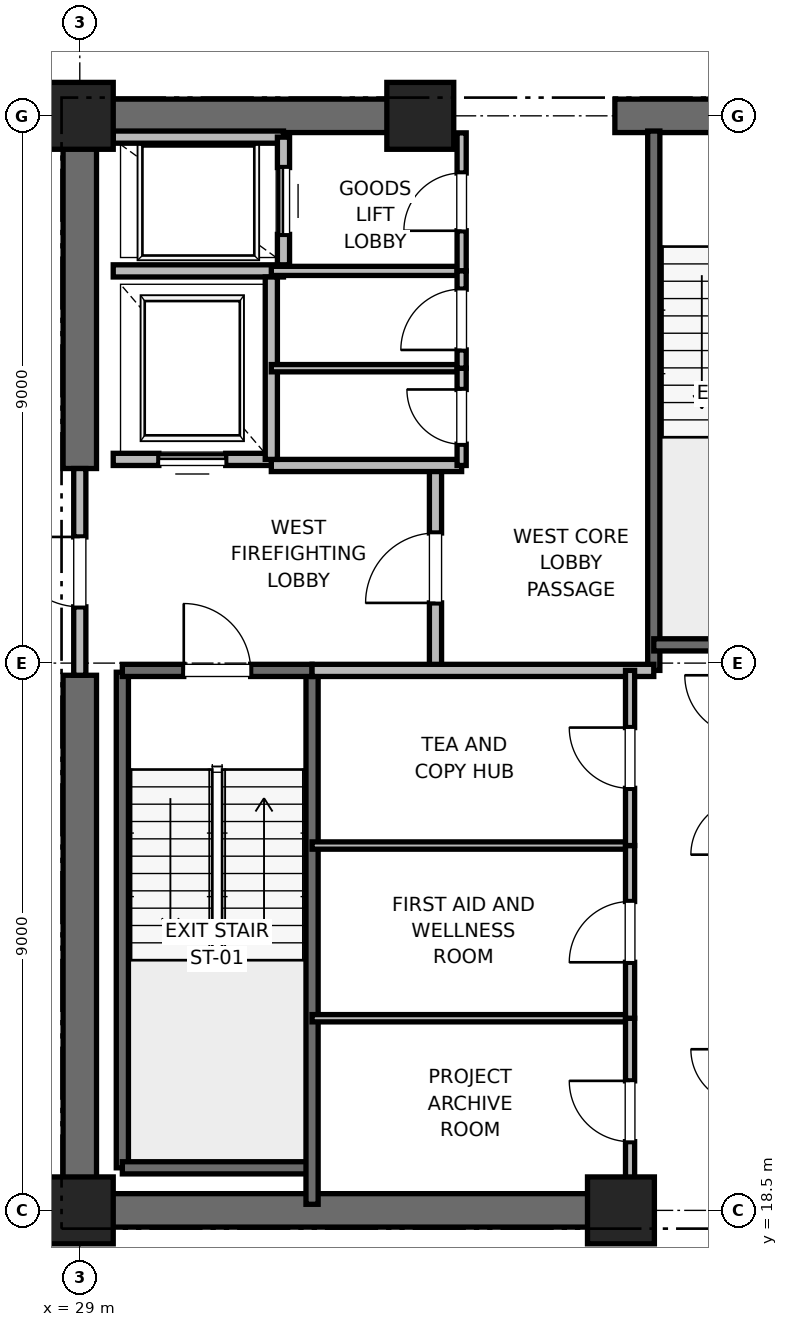
"""IFC4 building model, lengths in metres.
Left out: names, types, materials, properties, quantities, classifications, styles, units other than length and angle.
Written with IfcOpenShell. Run it as: python <this file> out.ifc"""

import sys

from ifc_helpers import new_model, si_unit, direction, frame, frame_2d, origin, origin_2d, place, context, subcontext, project, spatial, rectangle, extrude, element, fill, save


model = new_model("IFC4")
c1 = context("Model", 3, precision=1e-05, world=origin(), true_north=direction((0.0, 1.0)))
c2 = subcontext(c1, "Body", "Model", "MODEL_VIEW")
j1 = project(units=[si_unit("LENGTHUNIT", "METRE"), si_unit("PLANEANGLEUNIT", "RADIAN")], contexts=[c1])
p1 = place(None, origin())
s1 = spatial("IfcSite", under=j1, at=p1, CompositionType="ELEMENT")
p2 = place(p1, origin())
s2 = spatial("IfcBuilding", under=s1, at=p2, CompositionType="ELEMENT")
p3 = place(p2, frame((0.0, 0.0, 172.4)))
s3 = spatial("IfcBuildingStorey", under=s2, at=p3, CompositionType="ELEMENT", Elevation=172.4)
for number, where, z_axis, x_axis in (
    (1, (29.0, 18.5, 0.0), (0.0, 0.0, 1.0), (1.0, 0.0, 0.0)),
    (2, (29.0, 36.5, 0.0), (0.0, 0.0, 1.0), (1.0, 0.0, 0.0)),
    (3, (37.9, 18.5, 0.0), (0.0, 0.0, 1.0), (1.0, 0.0, 0.0)),
    (4, (34.6, 36.5, 0.0), (0.0, 0.0, 1.0), (1.0, 0.0, 0.0)),
):
    element("IfcColumn", number, at=place(p3, frame(where, z_axis=z_axis, x_axis=x_axis)), inside=s3, PredefinedType="PILASTER", context=c2, shape_type="SweptSolid", body=[
        extrude(rectangle(XDim=1.1, YDim=1.1, at=origin_2d()), origin(), (0.0, 0.0, 1.0), 4.0),
    ])
p4 = place(p3, frame((29.0, 18.5, 0.0), z_axis=(0.0, 0.0, 1.0), x_axis=(1.0, 0.0, 0.0)))
e5 = element("IfcWall", 5, at=p4, inside=s3, PredefinedType="SHEAR", context=c2, shape_type="SweptSolid", body=[
    extrude(rectangle(XDim=9.2, YDim=0.55, at=frame_2d((4.6, 0.0))), origin(), (0.0, 0.0, 1.0), 3.775),
])
p5 = place(p3, frame((29.0, 36.5, 0.0), z_axis=(0.0, 0.0, 1.0), x_axis=(1.0, 0.0, 0.0)))
e6 = element("IfcWall", 6, at=p5, inside=s3, PredefinedType="SHEAR", context=c2, shape_type="SweptSolid", body=[
    extrude(rectangle(XDim=5.8, YDim=0.55, at=frame_2d((2.9, 0.0))), origin(), (0.0, 0.0, 1.0), 3.775),
])
p6 = place(p3, frame((37.8, 36.5, 0.0), z_axis=(0.0, 0.0, 1.0), x_axis=(1.0, 0.0, 0.0)))
e7 = element("IfcWall", 7, at=p6, inside=s3, PredefinedType="SHEAR", context=c2, shape_type="SweptSolid", body=[
    extrude(rectangle(XDim=4.4, YDim=0.55, at=frame_2d((2.2, 0.0))), origin(), (0.0, 0.0, 1.0), 3.775),
])
p7 = place(p6, frame((1.65, 0.0, 0.0)))
e8 = element("IfcOpeningElement", 8, at=p7, cuts=e7, PredefinedType="OPENING", context=c2, shape_type="SweptSolid", body=[
    extrude(rectangle(XDim=1.1, YDim=2.15, at=frame_2d((0.55, 1.075))), frame((0.0, 0.275, 0.0), z_axis=(0.0, -1.0, 0.0), x_axis=(1.0, 0.0, 0.0)), (0.0, 0.0, 1.0), 0.55),
])
p8 = place(p3, frame((29.0, 18.5, 0.0), z_axis=(0.0, 0.0, 1.0), x_axis=(0.0, 1.0, 0.0)))
e9 = element("IfcWall", 9, at=p8, inside=s3, PredefinedType="SHEAR", context=c2, shape_type="SweptSolid", body=[
    extrude(rectangle(XDim=8.8, YDim=0.55, at=frame_2d((4.4, 0.0))), origin(), (0.0, 0.0, 1.0), 3.775),
])
p9 = place(p3, frame((29.0, 30.7, 0.0), z_axis=(0.0, 0.0, 1.0), x_axis=(0.0, 1.0, 0.0)))
e10 = element("IfcWall", 10, at=p9, inside=s3, PredefinedType="SHEAR", context=c2, shape_type="SweptSolid", body=[
    extrude(rectangle(XDim=5.8, YDim=0.55, at=frame_2d((2.9, 0.0))), origin(), (0.0, 0.0, 1.0), 3.775),
])
p10 = place(p3, frame((29.7, 19.2, 0.0), z_axis=(0.0, 0.0, 1.0), x_axis=(0.0, 1.0, 0.0)))
e11 = element("IfcWall", 11, at=p10, inside=s3, PredefinedType="SOLIDWALL", context=c2, shape_type="SweptSolid", body=[
    extrude(rectangle(XDim=8.15, YDim=0.2, at=frame_2d((4.075, 0.0))), origin(), (0.0, 0.0, 1.0), 3.775),
])
p11 = place(p3, frame((29.7, 19.2, 0.0), z_axis=(0.0, 0.0, 1.0), x_axis=(1.0, 0.0, 0.0)))
e12 = element("IfcWall", 12, at=p11, inside=s3, PredefinedType="SOLIDWALL", context=c2, shape_type="SweptSolid", body=[
    extrude(rectangle(XDim=3.12, YDim=0.2, at=frame_2d((1.56, 0.0))), origin(), (0.0, 0.0, 1.0), 3.775),
])
p12 = place(p3, frame((32.82, 18.6, 0.0), z_axis=(0.0, 0.0, 1.0), x_axis=(0.0, 1.0, 0.0)))
e13 = element("IfcWall", 13, at=p12, inside=s3, PredefinedType="SOLIDWALL", context=c2, shape_type="SweptSolid", body=[
    extrude(rectangle(XDim=8.78, YDim=0.2, at=frame_2d((4.39, 0.0))), origin(), (0.0, 0.0, 1.0), 3.775),
])
p13 = place(p3, frame((29.7, 27.38, 0.0), z_axis=(0.0, 0.0, 1.0), x_axis=(1.0, 0.0, 0.0)))
e14 = element("IfcWall", 14, at=p13, inside=s3, PredefinedType="SOLIDWALL", context=c2, shape_type="SweptSolid", body=[
    extrude(rectangle(XDim=3.12, YDim=0.2, at=frame_2d((1.56, 0.0))), origin(), (0.0, 0.0, 1.0), 3.775),
])
p14 = place(p13, frame((1.01, 0.0, 0.0)))
e15 = element("IfcOpeningElement", 15, at=p14, cuts=e14, PredefinedType="OPENING", context=c2, shape_type="SweptSolid", body=[
    extrude(rectangle(XDim=1.1, YDim=2.15, at=frame_2d((0.55, 1.075))), frame((0.0, 0.1, 0.0), z_axis=(0.0, -1.0, 0.0), x_axis=(1.0, 0.0, 0.0)), (0.0, 0.0, 1.0), 0.2),
])
p15 = place(p3, frame((38.44, 27.38, 0.0), z_axis=(0.0, 0.0, 1.0), x_axis=(0.0, 1.0, 0.0)))
e16 = element("IfcWall", 16, at=p15, inside=s3, PredefinedType="SOLIDWALL", context=c2, shape_type="SweptSolid", body=[
    extrude(rectangle(XDim=8.87, YDim=0.2, at=frame_2d((4.435, 0.0))), origin(), (0.0, 0.0, 1.0), 3.775),
])
p16 = place(p3, frame((38.44, 27.8, 0.0), z_axis=(0.0, 0.0, 1.0), x_axis=(1.0, 0.0, 0.0)))
e17 = element("IfcWall", 17, at=p16, inside=s3, PredefinedType="SOLIDWALL", context=c2, shape_type="SweptSolid", body=[
    extrude(rectangle(XDim=3.32, YDim=0.2, at=frame_2d((1.66, 0.0))), origin(), (0.0, 0.0, 1.0), 3.775),
])
p17 = place(p3, frame((34.85, 27.38, 0.0), z_axis=(0.0, 0.0, 1.0), x_axis=(0.0, 1.0, 0.0)))
e18 = element("IfcWall", 18, at=p17, inside=s3, PredefinedType="PARTITIONING", context=c2, shape_type="SweptSolid", body=[
    extrude(rectangle(XDim=3.37, YDim=0.2, at=frame_2d((1.685, 0.0))), origin(), (0.0, 0.0, 1.0), 3.775),
])
p18 = place(p17, frame((1.11, 0.0, 0.0)))
e19 = element("IfcOpeningElement", 19, at=p18, cuts=e18, PredefinedType="OPENING", context=c2, shape_type="SweptSolid", body=[
    extrude(rectangle(XDim=1.15, YDim=2.2, at=frame_2d((0.575, 1.1))), frame((0.0, 0.1, 0.0), z_axis=(0.0, -1.0, 0.0), x_axis=(1.0, 0.0, 0.0)), (0.0, 0.0, 1.0), 0.2),
])
p19 = place(p3, frame((29.0, 27.3, 0.0), z_axis=(0.0, 0.0, 1.0), x_axis=(0.0, 1.0, 0.0)))
e20 = element("IfcWall", 20, at=p19, inside=s3, PredefinedType="PARTITIONING", context=c2, shape_type="SweptSolid", body=[
    extrude(rectangle(XDim=3.4, YDim=0.2, at=frame_2d((1.7, 0.0))), origin(), (0.0, 0.0, 1.0), 2.755),
])
p20 = place(p19, frame((1.125, 0.0, 0.0)))
e21 = element("IfcOpeningElement", 21, at=p20, cuts=e20, PredefinedType="OPENING", context=c2, shape_type="SweptSolid", body=[
    extrude(rectangle(XDim=1.15, YDim=2.2, at=frame_2d((0.575, 1.1))), frame((0.0, 0.1, 0.0), z_axis=(0.0, -1.0, 0.0), x_axis=(1.0, 0.0, 0.0)), (0.0, 0.0, 1.0), 0.2),
])
p21 = place(p3, frame((32.82, 27.38, 0.0), z_axis=(0.0, 0.0, 1.0), x_axis=(1.0, 0.0, 0.0)))
e22 = element("IfcWall", 22, at=p21, inside=s3, PredefinedType="PARTITIONING", context=c2, shape_type="SweptSolid", body=[
    extrude(rectangle(XDim=5.62, YDim=0.2, at=frame_2d((2.81, 0.0))), origin(), (0.0, 0.0, 1.0), 3.775),
])
p22 = place(p3, frame((32.15, 30.75, 0.0), z_axis=(0.0, 0.0, 1.0), x_axis=(1.0, 0.0, 0.0)))
e23 = element("IfcWall", 23, at=p22, inside=s3, PredefinedType="PARTITIONING", context=c2, shape_type="SweptSolid", body=[
    extrude(rectangle(XDim=3.13, YDim=0.2, at=frame_2d((1.565, 0.0))), origin(), (0.0, 0.0, 1.0), 3.775),
])
p23 = place(p3, frame((29.55, 30.85, 0.0), z_axis=(0.0, 0.0, 1.0), x_axis=(1.0, 0.0, 0.0)))
e24 = element("IfcWall", 24, at=p23, inside=s3, PredefinedType="SOLIDWALL", context=c2, shape_type="SweptSolid", body=[
    extrude(rectangle(XDim=2.6, YDim=0.2, at=frame_2d((1.3, 0.0))), origin(), (0.0, 0.0, 1.0), 2.755),
])
p24 = place(p23, frame((0.75, 0.0, 0.0)))
e25 = element("IfcOpeningElement", 25, at=p24, cuts=e24, PredefinedType="OPENING", context=c2, shape_type="SweptSolid", body=[
    extrude(rectangle(XDim=1.1, YDim=2.2, at=frame_2d((0.55, 1.1))), frame((0.0, 0.1, 0.0), z_axis=(0.0, -1.0, 0.0), x_axis=(1.0, 0.0, 0.0)), (0.0, 0.0, 1.0), 0.2),
])
p25 = place(p3, frame((29.55, 33.95, 0.0), z_axis=(0.0, 0.0, 1.0), x_axis=(1.0, 0.0, 0.0)))
e26 = element("IfcWall", 26, at=p25, inside=s3, PredefinedType="SOLIDWALL", context=c2, shape_type="SweptSolid", body=[
    extrude(rectangle(XDim=2.8, YDim=0.2, at=frame_2d((1.4, 0.0))), origin(), (0.0, 0.0, 1.0), 3.775),
])
p26 = place(p3, frame((32.15, 30.85, 0.0), z_axis=(0.0, 0.0, 1.0), x_axis=(0.0, 1.0, 0.0)))
e27 = element("IfcWall", 27, at=p26, inside=s3, PredefinedType="SOLIDWALL", context=c2, shape_type="SweptSolid", body=[
    extrude(rectangle(XDim=3.0, YDim=0.2, at=frame_2d((1.5, 0.0))), origin(), (0.0, 0.0, 1.0), 3.775),
])
p27 = place(p3, frame((32.35, 36.15, 0.0), z_axis=(0.0, 0.0, 1.0), x_axis=(-1.0, 0.0, 0.0)))
e28 = element("IfcWall", 28, at=p27, inside=s3, PredefinedType="SOLIDWALL", context=c2, shape_type="SweptSolid", body=[
    extrude(rectangle(XDim=2.8, YDim=0.2, at=frame_2d((1.4, 0.0))), origin(), (0.0, 0.0, 1.0), 2.985),
])
p28 = place(p3, frame((32.35, 34.05, 0.0), z_axis=(0.0, 0.0, 1.0), x_axis=(0.0, 1.0, 0.0)))
e29 = element("IfcWall", 29, at=p28, inside=s3, PredefinedType="SOLIDWALL", context=c2, shape_type="SweptSolid", body=[
    extrude(rectangle(XDim=2.1, YDim=0.2, at=frame_2d((1.05, 0.0))), origin(), (0.0, 0.0, 1.0), 3.775),
])
p29 = place(p28, frame((0.5, 0.0, 0.0)))
e30 = element("IfcOpeningElement", 30, at=p29, cuts=e29, PredefinedType="OPENING", context=c2, shape_type="SweptSolid", body=[
    extrude(rectangle(XDim=1.1, YDim=2.2, at=frame_2d((0.55, 1.1))), frame((0.0, 0.1, 0.0), z_axis=(0.0, -1.0, 0.0), x_axis=(1.0, 0.0, 0.0)), (0.0, 0.0, 1.0), 0.2),
])
p30 = place(p3, frame((32.15, 33.95, 0.0), z_axis=(0.0, 0.0, 1.0), x_axis=(1.0, 0.0, 0.0)))
e31 = element("IfcWall", 31, at=p30, inside=s3, PredefinedType="PARTITIONING", context=c2, shape_type="SweptSolid", body=[
    extrude(rectangle(XDim=3.13, YDim=0.15, at=frame_2d((1.565, 0.0))), origin(), (0.0, 0.0, 1.0), 2.85),
])
p31 = place(p3, frame((35.28, 33.95, 0.0), z_axis=(0.0, 0.0, 1.0), x_axis=(0.0, 1.0, 0.0)))
e32 = element("IfcWall", 32, at=p31, inside=s3, PredefinedType="PARTITIONING", context=c2, shape_type="SweptSolid", body=[
    extrude(rectangle(XDim=2.27, YDim=0.15, at=frame_2d((1.135, 0.0))), origin(), (0.0, 0.0, 1.0), 2.755),
])
p32 = place(p31, frame((0.66, 0.0, 0.0)))
e33 = element("IfcOpeningElement", 33, at=p32, cuts=e32, PredefinedType="OPENING", context=c2, shape_type="SweptSolid", body=[
    extrude(rectangle(XDim=0.95, YDim=2.15, at=frame_2d((0.475, 1.075))), frame((0.0, 0.075, 0.0), z_axis=(0.0, -1.0, 0.0), x_axis=(1.0, 0.0, 0.0)), (0.0, 0.0, 1.0), 0.15),
])
p33 = place(p3, frame((32.15, 32.35, 0.0), z_axis=(0.0, 0.0, 1.0), x_axis=(1.0, 0.0, 0.0)))
e34 = element("IfcWall", 34, at=p33, inside=s3, PredefinedType="PARTITIONING", context=c2, shape_type="SweptSolid", body=[
    extrude(rectangle(XDim=3.13, YDim=0.12, at=frame_2d((1.565, 0.0))), origin(), (0.0, 0.0, 1.0), 2.85),
])
p34 = place(p3, frame((35.28, 30.75, 0.0), z_axis=(0.0, 0.0, 1.0), x_axis=(0.0, 1.0, 0.0)))
e35 = element("IfcWall", 35, at=p34, inside=s3, PredefinedType="PARTITIONING", context=c2, shape_type="SweptSolid", body=[
    extrude(rectangle(XDim=1.6, YDim=0.15, at=frame_2d((0.8, 0.0))), origin(), (0.0, 0.0, 1.0), 2.85),
])
p35 = place(p34, frame((0.35, 0.0, 0.0)))
e36 = element("IfcOpeningElement", 36, at=p35, cuts=e35, PredefinedType="OPENING", context=c2, shape_type="SweptSolid", body=[
    extrude(rectangle(XDim=0.9, YDim=2.1, at=frame_2d((0.45, 1.05))), frame((0.0, 0.075, 0.0), z_axis=(0.0, -1.0, 0.0), x_axis=(1.0, 0.0, 0.0)), (0.0, 0.0, 1.0), 0.15),
])
p36 = place(p3, frame((35.28, 32.35, 0.0), z_axis=(0.0, 0.0, 1.0), x_axis=(0.0, 1.0, 0.0)))
e37 = element("IfcWall", 37, at=p36, inside=s3, PredefinedType="PARTITIONING", context=c2, shape_type="SweptSolid", body=[
    extrude(rectangle(XDim=1.6, YDim=0.15, at=frame_2d((0.8, 0.0))), origin(), (0.0, 0.0, 1.0), 2.85),
])
p37 = place(p36, frame((0.3, 0.0, 0.0)))
e38 = element("IfcOpeningElement", 38, at=p37, cuts=e37, PredefinedType="OPENING", context=c2, shape_type="SweptSolid", body=[
    extrude(rectangle(XDim=1.0, YDim=2.15, at=frame_2d((0.5, 1.075))), frame((0.0, 0.075, 0.0), z_axis=(0.0, -1.0, 0.0), x_axis=(1.0, 0.0, 0.0)), (0.0, 0.0, 1.0), 0.15),
])
for number, where, z_axis, x_axis in (
    (39, (32.82, 21.66, 0.0), (0.0, 0.0, 1.0), (1.0, 0.0, 0.0)),
    (40, (32.82, 24.5, 0.0), (0.0, 0.0, 1.0), (1.0, 0.0, 0.0)),
):
    element("IfcWall", number, at=place(p3, frame(where, z_axis=z_axis, x_axis=x_axis)), inside=s3, PredefinedType="PARTITIONING", context=c2, shape_type="SweptSolid", body=[
        extrude(rectangle(XDim=5.23, YDim=0.12, at=frame_2d((2.615, 0.0))), origin(), (0.0, 0.0, 1.0), 2.85),
    ])
p38 = place(p3, frame((38.05, 18.6, 0.0), z_axis=(0.0, 0.0, 1.0), x_axis=(0.0, 1.0, 0.0)))
e41 = element("IfcWall", 41, at=p38, inside=s3, PredefinedType="PARTITIONING", context=c2, shape_type="SweptSolid", body=[
    extrude(rectangle(XDim=3.06, YDim=0.15, at=frame_2d((1.53, 0.0))), origin(), (0.0, 0.0, 1.0), 2.755),
])
p39 = place(p38, frame((1.03, 0.0, 0.0)))
e42 = element("IfcOpeningElement", 42, at=p39, cuts=e41, PredefinedType="OPENING", context=c2, shape_type="SweptSolid", body=[
    extrude(rectangle(XDim=1.0, YDim=2.15, at=frame_2d((0.5, 1.075))), frame((0.0, 0.075, 0.0), z_axis=(0.0, -1.0, 0.0), x_axis=(1.0, 0.0, 0.0)), (0.0, 0.0, 1.0), 0.15),
])
p40 = place(p3, frame((38.05, 21.66, 0.0), z_axis=(0.0, 0.0, 1.0), x_axis=(0.0, 1.0, 0.0)))
e43 = element("IfcWall", 43, at=p40, inside=s3, PredefinedType="PARTITIONING", context=c2, shape_type="SweptSolid", body=[
    extrude(rectangle(XDim=2.84, YDim=0.15, at=frame_2d((1.42, 0.0))), origin(), (0.0, 0.0, 1.0), 2.85),
])
p41 = place(p40, frame((0.92, 0.0, 0.0)))
e44 = element("IfcOpeningElement", 44, at=p41, cuts=e43, PredefinedType="OPENING", context=c2, shape_type="SweptSolid", body=[
    extrude(rectangle(XDim=1.0, YDim=2.15, at=frame_2d((0.5, 1.075))), frame((0.0, 0.075, 0.0), z_axis=(0.0, -1.0, 0.0), x_axis=(1.0, 0.0, 0.0)), (0.0, 0.0, 1.0), 0.15),
])
p42 = place(p3, frame((38.05, 24.5, 0.0), z_axis=(0.0, 0.0, 1.0), x_axis=(0.0, 1.0, 0.0)))
e45 = element("IfcWall", 45, at=p42, inside=s3, PredefinedType="PARTITIONING", context=c2, shape_type="SweptSolid", body=[
    extrude(rectangle(XDim=2.88, YDim=0.15, at=frame_2d((1.44, 0.0))), origin(), (0.0, 0.0, 1.0), 2.85),
])
p43 = place(p42, frame((0.94, 0.0, 0.0)))
e46 = element("IfcOpeningElement", 46, at=p43, cuts=e45, PredefinedType="OPENING", context=c2, shape_type="SweptSolid", body=[
    extrude(rectangle(XDim=1.0, YDim=2.15, at=frame_2d((0.5, 1.075))), frame((0.0, 0.075, 0.0), z_axis=(0.0, -1.0, 0.0), x_axis=(1.0, 0.0, 0.0)), (0.0, 0.0, 1.0), 0.15),
])
p44 = place(p14, origin())
e47 = element("IfcDoor", 47, at=p44, inside=s3, OperationType="SINGLE_SWING_LEFT", PredefinedType="DOOR", context=c2, shape_type="SweptSolid", body=[
    extrude(rectangle(XDim=1.1, YDim=2.15, at=frame_2d((0.55, 1.075))), frame((0.0, 0.025, 0.0), z_axis=(0.0, -1.0, 0.0), x_axis=(1.0, 0.0, 0.0)), (0.0, 0.0, 1.0), 0.05),
])
fill(e15, e47)
p45 = place(p18, origin())
e48 = element("IfcDoor", 48, at=p45, inside=s3, OperationType="SINGLE_SWING_LEFT", PredefinedType="DOOR", context=c2, shape_type="SweptSolid", body=[
    extrude(rectangle(XDim=1.15, YDim=2.2, at=frame_2d((0.575, 1.1))), frame((0.0, 0.025, 0.0), z_axis=(0.0, -1.0, 0.0), x_axis=(1.0, 0.0, 0.0)), (0.0, 0.0, 1.0), 0.05),
])
fill(e19, e48)
p46 = place(p20, origin())
e49 = element("IfcDoor", 49, at=p46, inside=s3, OperationType="SINGLE_SWING_RIGHT", PredefinedType="DOOR", context=c2, shape_type="SweptSolid", body=[
    extrude(rectangle(XDim=1.15, YDim=2.2, at=frame_2d((0.575, 1.1))), frame((0.0, 0.025, 0.0), z_axis=(0.0, -1.0, 0.0), x_axis=(1.0, 0.0, 0.0)), (0.0, 0.0, 1.0), 0.05),
])
fill(e21, e49)
p47 = place(p24, origin())
e50 = element("IfcDoor", 50, at=p47, inside=s3, OperationType="SLIDING_TO_RIGHT", PredefinedType="DOOR", context=c2, shape_type="SweptSolid", body=[
    extrude(rectangle(XDim=1.1, YDim=2.2, at=frame_2d((0.55, 1.1))), frame((0.0, 0.025, 0.0), z_axis=(0.0, -1.0, 0.0), x_axis=(1.0, 0.0, 0.0)), (0.0, 0.0, 1.0), 0.05),
])
fill(e25, e50)
p48 = place(p29, origin())
e51 = element("IfcDoor", 51, at=p48, inside=s3, OperationType="SLIDING_TO_RIGHT", PredefinedType="DOOR", context=c2, shape_type="SweptSolid", body=[
    extrude(rectangle(XDim=1.1, YDim=2.2, at=frame_2d((0.55, 1.1))), frame((0.0, 0.025, 0.0), z_axis=(0.0, -1.0, 0.0), x_axis=(1.0, 0.0, 0.0)), (0.0, 0.0, 1.0), 0.05),
])
fill(e30, e51)
p49 = place(p32, origin())
e52 = element("IfcDoor", 52, at=p49, inside=s3, OperationType="SINGLE_SWING_LEFT", PredefinedType="DOOR", context=c2, shape_type="SweptSolid", body=[
    extrude(rectangle(XDim=0.95, YDim=2.15, at=frame_2d((0.475, 1.075))), frame((0.0, 0.025, 0.0), z_axis=(0.0, -1.0, 0.0), x_axis=(1.0, 0.0, 0.0)), (0.0, 0.0, 1.0), 0.05),
])
fill(e33, e52)
p50 = place(p35, origin())
e53 = element("IfcDoor", 53, at=p50, inside=s3, OperationType="SINGLE_SWING_RIGHT", PredefinedType="DOOR", context=c2, shape_type="SweptSolid", body=[
    extrude(rectangle(XDim=0.9, YDim=2.1, at=frame_2d((0.45, 1.05))), frame((0.0, 0.025, 0.0), z_axis=(0.0, -1.0, 0.0), x_axis=(1.0, 0.0, 0.0)), (0.0, 0.0, 1.0), 0.05),
])
fill(e36, e53)
p51 = place(p37, origin())
e54 = element("IfcDoor", 54, at=p51, inside=s3, OperationType="SINGLE_SWING_LEFT", PredefinedType="DOOR", context=c2, shape_type="SweptSolid", body=[
    extrude(rectangle(XDim=1.0, YDim=2.15, at=frame_2d((0.5, 1.075))), frame((0.0, 0.025, 0.0), z_axis=(0.0, -1.0, 0.0), x_axis=(1.0, 0.0, 0.0)), (0.0, 0.0, 1.0), 0.05),
])
fill(e38, e54)
p52 = place(p39, origin())
e55 = element("IfcDoor", 55, at=p52, inside=s3, OperationType="SINGLE_SWING_RIGHT", PredefinedType="DOOR", context=c2, shape_type="SweptSolid", body=[
    extrude(rectangle(XDim=1.0, YDim=2.15, at=frame_2d((0.5, 1.075))), frame((0.0, 0.025, 0.0), z_axis=(0.0, -1.0, 0.0), x_axis=(1.0, 0.0, 0.0)), (0.0, 0.0, 1.0), 0.05),
])
fill(e42, e55)
p53 = place(p41, origin())
e56 = element("IfcDoor", 56, at=p53, inside=s3, OperationType="SINGLE_SWING_LEFT", PredefinedType="DOOR", context=c2, shape_type="SweptSolid", body=[
    extrude(rectangle(XDim=1.0, YDim=2.15, at=frame_2d((0.5, 1.075))), frame((0.0, 0.025, 0.0), z_axis=(0.0, -1.0, 0.0), x_axis=(1.0, 0.0, 0.0)), (0.0, 0.0, 1.0), 0.05),
])
fill(e44, e56)
p54 = place(p43, origin())
e57 = element("IfcDoor", 57, at=p54, inside=s3, OperationType="SINGLE_SWING_RIGHT", PredefinedType="DOOR", context=c2, shape_type="SweptSolid", body=[
    extrude(rectangle(XDim=1.0, YDim=2.15, at=frame_2d((0.5, 1.075))), frame((0.0, 0.025, 0.0), z_axis=(0.0, -1.0, 0.0), x_axis=(1.0, 0.0, 0.0)), (0.0, 0.0, 1.0), 0.05),
])
fill(e46, e57)
save(model, sys.argv[1])
